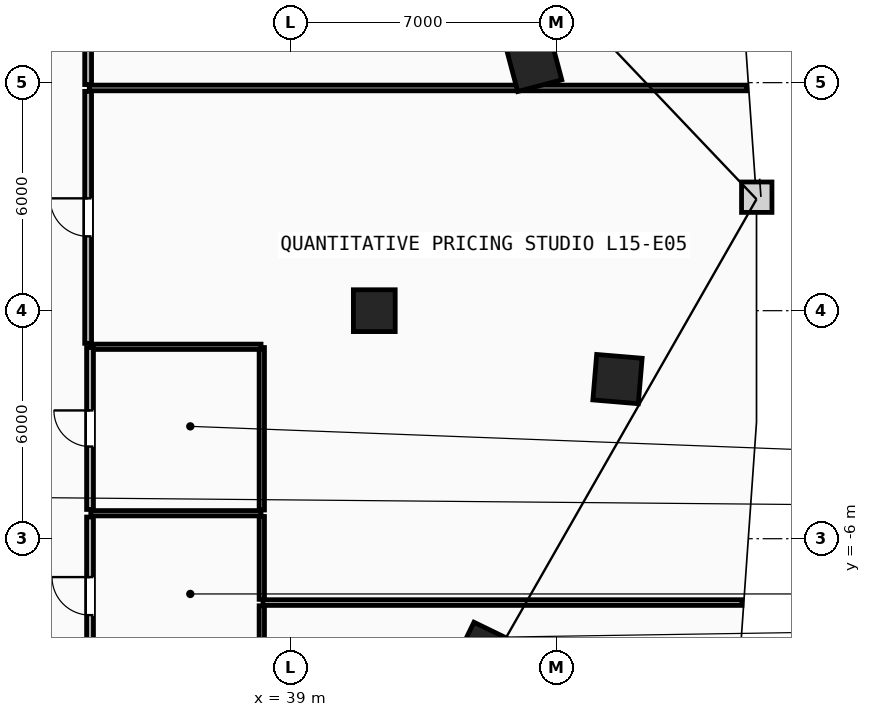
"""IFC4 building model, lengths in metres.
Left out: names, types, materials, properties, quantities, classifications, styles, units other than length and angle.
Written with IfcOpenShell. Run it as: python <this file> out.ifc"""

import sys

from ifc_helpers import new_model, si_unit, direction, frame, frame_2d, origin, origin_2d, place, context, subcontext, project, spatial, rectangle, extrude, element, fill, save


model = new_model("IFC4")
c1 = context("Model", 3, precision=1e-05, world=origin(), true_north=direction((0.0, 1.0)))
c2 = subcontext(c1, "Body", "Model", "MODEL_VIEW")
j1 = project(units=[si_unit("LENGTHUNIT", "METRE"), si_unit("PLANEANGLEUNIT", "RADIAN")], contexts=[c1])
p1 = place(None, origin())
s1 = spatial("IfcSite", under=j1, at=p1, CompositionType="ELEMENT")
p2 = place(p1, origin())
s2 = spatial("IfcBuilding", under=s1, at=p2, CompositionType="ELEMENT")
p3 = place(p2, frame((0.0, 0.0, 62.0)))
s3 = spatial("IfcBuildingStorey", under=s2, at=p3, CompositionType="ELEMENT", Elevation=62.0)
p4 = place(p3, frame((41.2, 0.0, 0.0), z_axis=(0.0, 0.0, 1.0), x_axis=(1.0, 0.0, 0.0)))
e1 = element("IfcColumn", 1, at=p4, inside=s3, PredefinedType="COLUMN", context=c2, shape_type="SweptSolid", body=[
    extrude(rectangle(XDim=1.1, YDim=1.1, at=origin_2d()), origin(), (0.0, 0.0, 1.0), 3.8),
])
for number, where, z_axis, x_axis in (
    (2, (44.1, -9.0, 0.0), (0.0, 0.0, 1.0), (0.437, 0.899, 0.0)),
    (3, (47.6, -1.8, 0.0), (0.0, 0.0, 1.0), (0.084, 0.997, 0.0)),
    (4, (45.4, 6.5, 0.0), (0.0, 0.0, 1.0), (-0.256, 0.967, 0.0)),
):
    element("IfcColumn", number, at=place(p3, frame(where, z_axis=z_axis, x_axis=x_axis)), inside=s3, PredefinedType="COLUMN", context=c2, shape_type="SweptSolid", body=[
        extrude(rectangle(XDim=1.2, YDim=1.2, at=origin_2d()), origin(), (0.0, 0.0, 1.0), 3.8),
    ])
p5 = place(p3, frame((38.24, -9.59, 0.0), z_axis=(0.0, 0.0, 1.0), x_axis=(0.0, 1.0, 0.0)))
e5 = element("IfcWall", 5, at=p5, inside=s3, PredefinedType="PARTITIONING", context=c2, shape_type="SweptSolid", body=[
    extrude(rectangle(XDim=1.825, YDim=0.14, at=frame_2d((0.913, 0.0))), origin(), (0.0, 0.0, 1.0), 3.5),
])
p6 = place(p3, frame((38.24, -7.595, 0.0), z_axis=(0.0, 0.0, 1.0), x_axis=(0.0, 1.0, 0.0)))
e6 = element("IfcWall", 6, at=p6, inside=s3, PredefinedType="PARTITIONING", context=c2, shape_type="SweptSolid", body=[
    extrude(rectangle(XDim=2.18, YDim=0.14, at=frame_2d((1.09, 0.0))), origin(), (0.0, 0.0, 1.0), 3.5),
])
p7 = place(p3, frame((38.24, -5.245, 0.0), z_axis=(0.0, 0.0, 1.0), x_axis=(0.0, 1.0, 0.0)))
e7 = element("IfcWall", 7, at=p7, inside=s3, PredefinedType="PARTITIONING", context=c2, shape_type="SweptSolid", body=[
    extrude(rectangle(XDim=4.275, YDim=0.14, at=frame_2d((2.138, 0.0))), origin(), (0.0, 0.0, 1.0), 3.5),
])
for number, where, z_axis, x_axis in (
    (8, (33.74, -0.95, 0.0), (0.0, 0.0, 1.0), (1.0, 0.0, 0.0)),
    (9, (33.74, -5.33, 0.0), (0.0, 0.0, 1.0), (1.0, 0.0, 0.0)),
):
    element("IfcWall", number, at=place(p3, frame(where, z_axis=z_axis, x_axis=x_axis)), inside=s3, PredefinedType="PARTITIONING", context=c2, shape_type="SweptSolid", body=[
        extrude(rectangle(XDim=4.48, YDim=0.14, at=frame_2d((2.24, 0.0))), origin(), (0.0, 0.0, 1.0), 3.5),
    ])
p8 = place(p3, frame((33.72, -5.23, 0.0), z_axis=(0.0, 0.0, 1.0), x_axis=(0.0, 1.0, 0.0)))
e10 = element("IfcWall", 10, at=p8, inside=s3, PredefinedType="PARTITIONING", context=c2, shape_type="SweptSolid", body=[
    extrude(rectangle(XDim=4.26, YDim=0.18, at=frame_2d((2.13, 0.0))), origin(), (0.0, 0.0, 1.0), 3.5),
])
p9 = place(p8, frame((1.655, 0.0, 0.0)))
e11 = element("IfcOpeningElement", 11, at=p9, cuts=e10, PredefinedType="OPENING", context=c2, shape_type="SweptSolid", body=[
    extrude(rectangle(XDim=0.95, YDim=2.1, at=frame_2d((0.475, 1.05))), frame((0.0, 0.1, 0.0), z_axis=(0.0, -1.0, 0.0), x_axis=(1.0, 0.0, 0.0)), (0.0, 0.0, 1.0), 0.2),
])
p10 = place(p3, frame((33.72, -9.59, 0.0), z_axis=(0.0, 0.0, 1.0), x_axis=(0.0, 1.0, 0.0)))
e12 = element("IfcWall", 12, at=p10, inside=s3, PredefinedType="PARTITIONING", context=c2, shape_type="SweptSolid", body=[
    extrude(rectangle(XDim=4.16, YDim=0.18, at=frame_2d((2.08, 0.0))), origin(), (0.0, 0.0, 1.0), 3.5),
])
p11 = place(p10, frame((1.58, 0.0, 0.0)))
e13 = element("IfcOpeningElement", 13, at=p11, cuts=e12, PredefinedType="OPENING", context=c2, shape_type="SweptSolid", body=[
    extrude(rectangle(XDim=1.0, YDim=2.15, at=frame_2d((0.5, 1.075))), frame((0.0, 0.1, 0.0), z_axis=(0.0, -1.0, 0.0), x_axis=(1.0, 0.0, 0.0)), (0.0, 0.0, 1.0), 0.2),
])
p12 = place(p3, frame((33.7, 5.86, 0.0), z_axis=(0.0, 0.0, 1.0), x_axis=(1.0, 0.0, 0.0)))
e14 = element("IfcWall", 14, at=p12, inside=s3, PredefinedType="PARTITIONING", context=c2, shape_type="SweptSolid", body=[
    extrude(rectangle(XDim=17.302, YDim=0.15, at=frame_2d((8.651, 0.0))), origin(), (0.0, 0.0, 1.0), 3.5),
])
p13 = place(p3, frame((38.27, -7.68, 0.0), z_axis=(0.0, 0.0, 1.0), x_axis=(1.0, 0.0, 0.0)))
e15 = element("IfcWall", 15, at=p13, inside=s3, PredefinedType="PARTITIONING", context=c2, shape_type="SweptSolid", body=[
    extrude(rectangle(XDim=12.604, YDim=0.15, at=frame_2d((6.302, 0.0))), origin(), (0.0, 0.0, 1.0), 3.5),
])
p14 = place(p3, frame((33.67, -0.859, 0.0), z_axis=(0.0, 0.0, 1.0), x_axis=(0.0, 1.0, 0.0)))
e16 = element("IfcWall", 16, at=p14, inside=s3, PredefinedType="PARTITIONING", context=c2, shape_type="SweptSolid", body=[
    extrude(rectangle(XDim=6.629, YDim=0.18, at=frame_2d((3.314, 0.0))), origin(), (0.0, 0.0, 1.0), 3.5),
])
p15 = place(p14, frame((2.814, 0.0, 0.0)))
e17 = element("IfcOpeningElement", 17, at=p15, cuts=e16, PredefinedType="OPENING", context=c2, shape_type="SweptSolid", body=[
    extrude(rectangle(XDim=1.0, YDim=2.15, at=frame_2d((0.5, 1.075))), frame((0.0, 0.1, 0.0), z_axis=(0.0, -1.0, 0.0), x_axis=(1.0, 0.0, 0.0)), (0.0, 0.0, 1.0), 0.2),
])
p16 = place(p3, frame((33.67, 5.95, 0.0), z_axis=(0.0, 0.0, 1.0), x_axis=(0.0, 1.0, 0.0)))
e18 = element("IfcWall", 18, at=p16, inside=s3, PredefinedType="PARTITIONING", context=c2, shape_type="SweptSolid", body=[
    extrude(rectangle(XDim=5.45, YDim=0.18, at=frame_2d((2.725, 0.0))), origin(), (0.0, 0.0, 1.0), 3.5),
])
p17 = place(p15, origin())
e19 = element("IfcDoor", 19, at=p17, inside=s3, OperationType="SINGLE_SWING_RIGHT", PredefinedType="DOOR", context=c2, shape_type="SweptSolid", body=[
    extrude(rectangle(XDim=1.0, YDim=2.15, at=frame_2d((0.5, 1.075))), frame((0.0, 0.025, 0.0), z_axis=(0.0, -1.0, 0.0), x_axis=(1.0, 0.0, 0.0)), (0.0, 0.0, 1.0), 0.05),
])
fill(e17, e19)
p18 = place(p9, origin())
e20 = element("IfcDoor", 20, at=p18, inside=s3, OperationType="SINGLE_SWING_RIGHT", PredefinedType="DOOR", context=c2, shape_type="SweptSolid", body=[
    extrude(rectangle(XDim=0.95, YDim=2.1, at=frame_2d((0.475, 1.05))), frame((0.0, 0.025, 0.0), z_axis=(0.0, -1.0, 0.0), x_axis=(1.0, 0.0, 0.0)), (0.0, 0.0, 1.0), 0.05),
])
fill(e11, e20)
p19 = place(p11, origin())
e21 = element("IfcDoor", 21, at=p19, inside=s3, OperationType="SINGLE_SWING_RIGHT", PredefinedType="DOOR", context=c2, shape_type="SweptSolid", body=[
    extrude(rectangle(XDim=1.0, YDim=2.15, at=frame_2d((0.5, 1.075))), frame((0.0, 0.025, 0.0), z_axis=(0.0, -1.0, 0.0), x_axis=(1.0, 0.0, 0.0)), (0.0, 0.0, 1.0), 0.05),
])
fill(e13, e21)
save(model, sys.argv[1])
